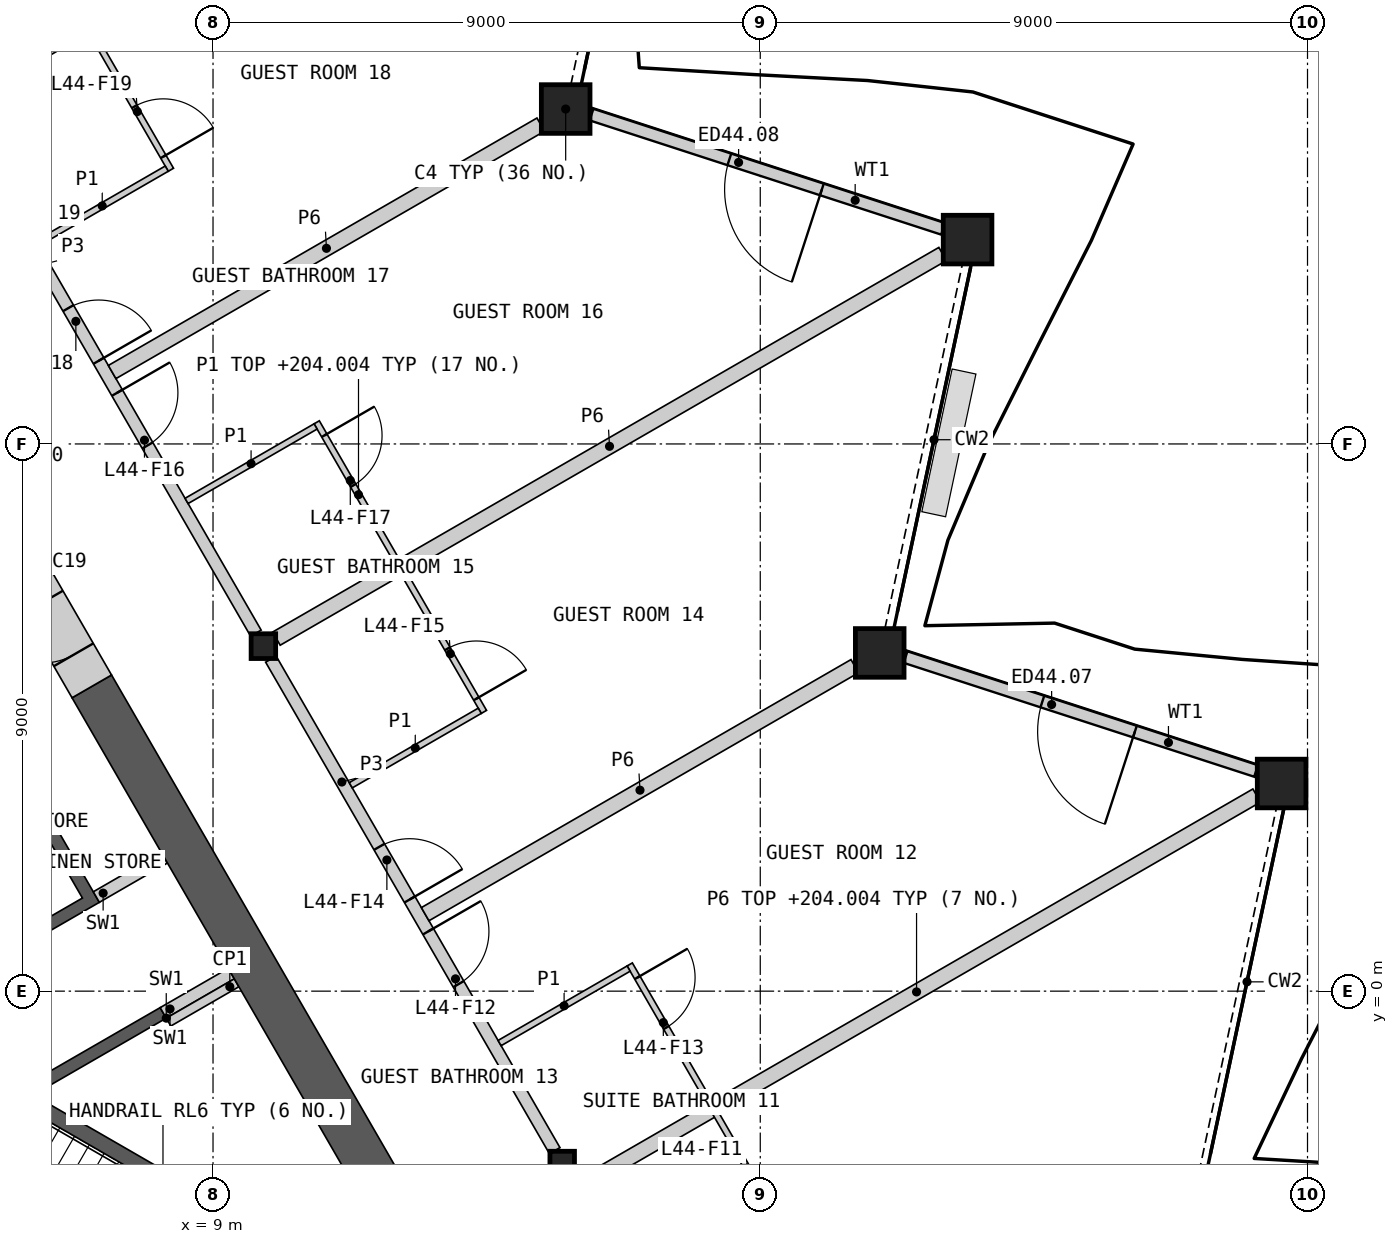
"""IFC4 building model, lengths in metres.
Left out: names, types, materials, properties, quantities, classifications, styles, units other than length and angle.
Written with IfcOpenShell. Run it as: python <this file> out.ifc"""

import sys

from ifc_helpers import new_model, si_unit, direction, frame, frame_2d, origin, origin_2d, place, context, subcontext, project, spatial, polyline, rectangle, hollow_rectangle, i_section, outline, extrude, element, fill, save


model = new_model("IFC4")
c1 = context("Model", 3, precision=1e-05, world=origin(), true_north=direction((0.0, 1.0)))
c2 = subcontext(c1, "Body", "Model", "MODEL_VIEW")
j1 = project(units=[si_unit("LENGTHUNIT", "METRE"), si_unit("PLANEANGLEUNIT", "RADIAN")], contexts=[c1])
p1 = place(None, origin())
s1 = spatial("IfcSite", under=j1, at=p1, CompositionType="ELEMENT")
p2 = place(p1, origin())
s2 = spatial("IfcBuilding", under=s1, at=p2, CompositionType="ELEMENT")
p3 = place(p2, frame((0.0, 0.0, 201.6)))
s3 = spatial("IfcBuildingStorey", under=s2, at=p3, CompositionType="ELEMENT", Elevation=201.6)
for number, where, z_axis, x_axis in (
    (1, (26.574, 3.415, 0.0), (0.0, 0.0, 1.0), (1.0, 0.0, 0.0)),
    (2, (19.965, 5.563, 0.0), (0.0, 0.0, 1.0), (1.0, 0.0, 0.0)),
    (3, (21.409, 12.361, 0.0), (0.0, 0.0, 1.0), (1.0, 0.0, 0.0)),
    (4, (14.8, 14.508, 0.0), (0.0, 0.0, 1.0), (1.0, 0.0, 0.0)),
):
    element("IfcColumn", number, at=place(p3, frame(where, z_axis=z_axis, x_axis=x_axis)), inside=s3, PredefinedType="COLUMN", context=c2, shape_type="SweptSolid", body=[
        extrude(hollow_rectangle(XDim=0.8, YDim=0.8, WallThickness=0.05, at=origin_2d()), origin(), (0.0, 0.0, 1.0), 3.6),
    ])
for number, where, z_axis, x_axis in (
    (5, (14.743, -2.837, 0.0), (0.0, 0.0, 1.0), (1.0, 0.0, 0.0)),
    (6, (9.828, 5.675, 0.0), (0.0, 0.0, 1.0), (1.0, 0.0, 0.0)),
):
    element("IfcColumn", number, at=place(p3, frame(where, z_axis=z_axis, x_axis=x_axis)), inside=s3, PredefinedType="COLUMN", context=c2, shape_type="SweptSolid", body=[
        extrude(i_section(OverallWidth=0.404, OverallDepth=0.407, WebThickness=0.027, FlangeThickness=0.044, at=origin_2d()), origin(), (0.0, 0.0, 1.0), 3.6),
    ])
p4 = place(p3, frame((26.154, 3.621, 0.0), z_axis=(0.0, 0.0, 1.0), x_axis=(-0.95104857086, 0.309041446839, 0.0)))
e7 = element("IfcWall", 7, at=p4, inside=s3, PredefinedType="SOLIDWALL", context=c2, shape_type="SweptSolid", body=[
    extrude(rectangle(XDim=6.062, YDim=0.2, at=frame_2d((3.031, 0.0))), origin(), (0.0, 0.0, 1.0), 2.701),
])
p5 = place(p4, frame((2.096, 0.0, 0.0)))
e8 = element("IfcOpeningElement", 8, at=p5, cuts=e7, PredefinedType="OPENING", context=c2, shape_type="SweptSolid", body=[
    extrude(rectangle(XDim=1.6, YDim=2.4, at=frame_2d((0.8, 1.2))), frame((0.0, 0.11, 0.0), z_axis=(0.0, -1.0, 0.0), x_axis=(1.0, 0.0, 0.0)), (0.0, 0.0, 1.0), 0.22),
])
p6 = place(p3, frame((21.006, 12.538, 0.0), z_axis=(0.0, 0.0, 1.0), x_axis=(-0.951049709595, 0.309037942458, 0.0)))
e9 = element("IfcWall", 9, at=p6, inside=s3, PredefinedType="SOLIDWALL", context=c2, shape_type="SweptSolid", body=[
    extrude(rectangle(XDim=6.079, YDim=0.2, at=frame_2d((3.04, 0.0))), origin(), (0.0, 0.0, 1.0), 2.701),
])
p7 = place(p6, frame((2.096, 0.0, 0.0)))
e10 = element("IfcOpeningElement", 10, at=p7, cuts=e9, PredefinedType="OPENING", context=c2, shape_type="SweptSolid", body=[
    extrude(rectangle(XDim=1.6, YDim=2.4, at=frame_2d((0.8, 1.2))), frame((0.0, 0.11, 0.0), z_axis=(0.0, -1.0, 0.0), x_axis=(1.0, 0.0, 0.0)), (0.0, 0.0, 1.0), 0.22),
])
p8 = place(p3, origin())
e11 = element("IfcWall", 11, at=p8, inside=s3, PredefinedType="SHEAR", context=c2, shape_type="SweptSolid", body=[
    extrude(outline(polyline([(1.561, 6.097), (3.731, 7.35), (7.131, 1.461), (4.96, 0.208), (4.861, 0.381), (6.852, 1.531), (4.752, 5.169), (2.76, 4.019), (2.66, 4.192), (4.652, 5.342), (3.652, 7.074), (1.66, 5.924), (1.561, 6.097)])), origin(), (0.0, 0.0, 1.0), 3.25),
])
p9 = place(p3, origin())
e12 = element("IfcWall", 12, at=p9, inside=s3, PredefinedType="SHEAR", context=c2, shape_type="SweptSolid", body=[
    extrude(outline(polyline([(8.231, -0.444), (6.061, -1.697), (5.96, -1.524), (8.131, -0.271), (8.231, -0.444)])), origin(), (0.0, 0.0, 1.0), 3.25),
])
for number, where, z_axis, x_axis in (
    (13, (8.181, -0.357, 0.0), (0.0, 0.0, 1.0), (0.866, 0.5, 0.0)),
    (14, (7.081, 1.548, 0.0), (0.0, 0.0, 1.0), (0.866, 0.5, 0.0)),
):
    element("IfcWall", number, at=place(p3, frame(where, z_axis=z_axis, x_axis=x_axis)), inside=s3, PredefinedType="SHEAR", context=c2, shape_type="SweptSolid", body=[
        extrude(rectangle(XDim=1.293, YDim=0.2, at=frame_2d((0.646, 0.0))), origin(), (0.0, 0.0, 1.0), 3.25),
    ])
p10 = place(p3, origin())
e15 = element("IfcWall", 15, at=p10, inside=s3, PredefinedType="SHEAR", context=c2, shape_type="SweptSolid", body=[
    extrude(outline(polyline([(10.032, -4.298), (10.374, -4.206), (5.307, -1.281), (5.182, -1.498), (10.032, -4.298)])), origin(), (0.0, 0.0, 1.0), 3.25),
])
p11 = place(p3, frame((8.268, -0.509, 0.0), z_axis=(0.0, 0.0, 1.0), x_axis=(0.866003189247, 0.500038474733, 0.0)))
e16 = element("IfcWall", 16, at=p11, inside=s3, PredefinedType="PARTITIONING", context=c2, shape_type="SweptSolid", body=[
    extrude(rectangle(XDim=1.293, YDim=0.15, at=frame_2d((0.646, 0.0))), origin(), (0.0, 0.0, 1.0), 3.25),
])
p12 = place(p3, frame((14.526, -8.011, 0.0), z_axis=(0.0, 0.0, 1.0), x_axis=(-0.499996012963, 0.866027705689, 0.0)))
e17 = element("IfcWall", 17, at=p12, inside=s3, PredefinedType="SHEAR", context=c2, shape_type="SweptSolid", body=[
    extrude(rectangle(XDim=15.039, YDim=0.75, at=frame_2d((7.519, 0.0))), origin(), (0.0, 0.0, 1.0), 3.25),
])
p13 = place(p3, frame((7.006, 5.012, 0.0), z_axis=(0.0, 0.0, 1.0), x_axis=(-0.499946605688, 0.86605622881, 0.0)))
e18 = element("IfcWall", 18, at=p13, inside=s3, PredefinedType="SHEAR", context=c2, shape_type="SweptSolid", body=[
    extrude(rectangle(XDim=2.2, YDim=0.75, at=frame_2d((1.1, 0.0))), origin(), (0.0, 0.0, 1.0), 3.25),
])
p14 = place(p13, frame((0.6, 0.0, 0.0)))
e19 = element("IfcOpeningElement", 19, at=p14, cuts=e18, PredefinedType="OPENING", context=c2, shape_type="SweptSolid", body=[
    extrude(rectangle(XDim=1.0, YDim=2.1, at=frame_2d((0.5, 1.05))), frame((0.0, 0.385, 0.0), z_axis=(0.0, -1.0, 0.0), x_axis=(1.0, 0.0, 0.0)), (0.0, 0.0, 1.0), 0.77),
])
p15 = place(p3, frame((14.977, -3.242, 0.0), z_axis=(0.0, 0.0, 1.0), x_axis=(0.866026026416, 0.499998921569, 0.0)))
e20 = element("IfcWall", 20, at=p15, inside=s3, PredefinedType="PARTITIONING", context=c2, shape_type="SweptSolid", body=[
    extrude(rectangle(XDim=12.918, YDim=0.25, at=frame_2d((6.459, 0.0))), origin(), (0.0, 0.0, 1.0), 2.404),
])
p16 = place(p3, frame((4.572, 14.529, 0.0), z_axis=(0.0, 0.0, 1.0), x_axis=(0.866023333059, 0.500003586584, 0.0)))
e21 = element("IfcWall", 21, at=p16, inside=s3, PredefinedType="PARTITIONING", context=c2, shape_type="SweptSolid", body=[
    extrude(rectangle(XDim=13.005, YDim=0.25, at=frame_2d((6.502, 0.0))), origin(), (0.0, 0.0, 1.0), 2.404),
])
p17 = place(p3, frame((10.042, 5.798, 0.0), z_axis=(0.0, 0.0, 1.0), x_axis=(0.866025883649, 0.499999168849, 0.0)))
e22 = element("IfcWall", 22, at=p17, inside=s3, PredefinedType="PARTITIONING", context=c2, shape_type="SweptSolid", body=[
    extrude(rectangle(XDim=12.652, YDim=0.25, at=frame_2d((6.326, 0.0))), origin(), (0.0, 0.0, 1.0), 2.404),
])
p18 = place(p3, frame((5.038, 13.972, 0.0), z_axis=(0.0, 0.0, 1.0), x_axis=(0.50000393355, -0.866023132736, 0.0)))
e23 = element("IfcWall", 23, at=p18, inside=s3, PredefinedType="PARTITIONING", context=c2, shape_type="SweptSolid", body=[
    extrude(rectangle(XDim=9.335, YDim=0.2, at=frame_2d((4.667, 0.0))), origin(), (0.0, 0.0, 1.0), 3.25),
])
p19 = place(p18, frame((4.77, 0.0, 0.0)))
e24 = element("IfcOpeningElement", 24, at=p19, cuts=e23, PredefinedType="OPENING", context=c2, shape_type="SweptSolid", body=[
    extrude(rectangle(XDim=1.0, YDim=2.1, at=frame_2d((0.5, 1.05))), frame((0.0, 0.11, 0.0), z_axis=(0.0, -1.0, 0.0), x_axis=(1.0, 0.0, 0.0)), (0.0, 0.0, 1.0), 0.22),
])
p20 = place(p18, frame((3.163, 0.0, 0.0)))
e25 = element("IfcOpeningElement", 25, at=p20, cuts=e23, PredefinedType="OPENING", context=c2, shape_type="SweptSolid", body=[
    extrude(rectangle(XDim=1.0, YDim=2.1, at=frame_2d((0.5, 1.05))), frame((0.0, 0.11, 0.0), z_axis=(0.0, -1.0, 0.0), x_axis=(1.0, 0.0, 0.0)), (0.0, 0.0, 1.0), 0.22),
])
p21 = place(p3, frame((9.952, 5.461, 0.0), z_axis=(0.0, 0.0, 1.0), x_axis=(0.50000393355, -0.866023132736, 0.0)))
e26 = element("IfcWall", 26, at=p21, inside=s3, PredefinedType="PARTITIONING", context=c2, shape_type="SweptSolid", body=[
    extrude(rectangle(XDim=9.335, YDim=0.2, at=frame_2d((4.667, 0.0))), origin(), (0.0, 0.0, 1.0), 3.25),
])
p22 = place(p21, frame((5.172, 0.0, 0.0)))
e27 = element("IfcOpeningElement", 27, at=p22, cuts=e26, PredefinedType="OPENING", context=c2, shape_type="SweptSolid", body=[
    extrude(rectangle(XDim=1.0, YDim=2.1, at=frame_2d((0.5, 1.05))), frame((0.0, 0.11, 0.0), z_axis=(0.0, -1.0, 0.0), x_axis=(1.0, 0.0, 0.0)), (0.0, 0.0, 1.0), 0.22),
])
p23 = place(p21, frame((3.565, 0.0, 0.0)))
e28 = element("IfcOpeningElement", 28, at=p23, cuts=e26, PredefinedType="OPENING", context=c2, shape_type="SweptSolid", body=[
    extrude(rectangle(XDim=1.0, YDim=2.1, at=frame_2d((0.5, 1.05))), frame((0.0, 0.11, 0.0), z_axis=(0.0, -1.0, 0.0), x_axis=(1.0, 0.0, 0.0)), (0.0, 0.0, 1.0), 0.22),
])
p24 = place(p3, frame((12.489, 1.266, 0.0), z_axis=(0.0, 0.0, 1.0), x_axis=(0.866026623601, 0.49999788721, 0.0)))
e29 = element("IfcWall", 29, at=p24, inside=s3, PredefinedType="PARTITIONING", context=c2, shape_type="SweptSolid", body=[
    extrude(rectangle(XDim=8.159, YDim=0.25, at=frame_2d((4.079, 0.0))), origin(), (0.0, 0.0, 1.0), 2.404),
])
p25 = place(p3, frame((7.341, 10.183, 0.0), z_axis=(0.0, 0.0, 1.0), x_axis=(0.866028741424, 0.499994218994, 0.0)))
e30 = element("IfcWall", 30, at=p25, inside=s3, PredefinedType="PARTITIONING", context=c2, shape_type="SweptSolid", body=[
    extrude(rectangle(XDim=8.139, YDim=0.25, at=frame_2d((4.07, 0.0))), origin(), (0.0, 0.0, 1.0), 2.404),
])
p26 = place(p3, frame((10.705, 9.356, 0.0), z_axis=(0.0, 0.0, 1.0), x_axis=(0.500015767406, -0.866016300277, 0.0)))
e31 = element("IfcWall", 31, at=p26, inside=s3, PredefinedType="PARTITIONING", context=c2, shape_type="SweptSolid", body=[
    extrude(rectangle(XDim=5.5, YDim=0.1, at=frame_2d((2.75, 0.0))), origin(), (0.0, 0.0, 1.0), 2.404),
])
p27 = place(p26, frame((4.3, 0.0, 0.0)))
e32 = element("IfcOpeningElement", 32, at=p27, cuts=e31, PredefinedType="OPENING", context=c2, shape_type="SweptSolid", body=[
    extrude(rectangle(XDim=0.95, YDim=2.1, at=frame_2d((0.475, 1.05))), frame((0.0, 0.06, 0.0), z_axis=(0.0, -1.0, 0.0), x_axis=(1.0, 0.0, 0.0)), (0.0, 0.0, 1.0), 0.12),
])
p28 = place(p26, frame((0.25, 0.0, 0.0)))
e33 = element("IfcOpeningElement", 33, at=p28, cuts=e31, PredefinedType="OPENING", context=c2, shape_type="SweptSolid", body=[
    extrude(rectangle(XDim=0.95, YDim=2.1, at=frame_2d((0.475, 1.05))), frame((0.0, 0.06, 0.0), z_axis=(0.0, -1.0, 0.0), x_axis=(1.0, 0.0, 0.0)), (0.0, 0.0, 1.0), 0.12),
])
p29 = place(p3, frame((5.707, 18.013, 0.0), z_axis=(0.0, 0.0, 1.0), x_axis=(0.500006934395, -0.866021400173, 0.0)))
e34 = element("IfcWall", 34, at=p29, inside=s3, PredefinedType="PARTITIONING", context=c2, shape_type="SweptSolid", body=[
    extrude(rectangle(XDim=5.2, YDim=0.1, at=frame_2d((2.6, 0.0))), origin(), (0.0, 0.0, 1.0), 2.404),
])
p30 = place(p29, frame((4.0, 0.0, 0.0)))
e35 = element("IfcOpeningElement", 35, at=p30, cuts=e34, PredefinedType="OPENING", context=c2, shape_type="SweptSolid", body=[
    extrude(rectangle(XDim=0.95, YDim=2.1, at=frame_2d((0.475, 1.05))), frame((0.0, 0.06, 0.0), z_axis=(0.0, -1.0, 0.0), x_axis=(1.0, 0.0, 0.0)), (0.0, 0.0, 1.0), 0.12),
])
p31 = place(p29, frame((0.25, 0.0, 0.0)))
e36 = element("IfcOpeningElement", 36, at=p31, cuts=e34, PredefinedType="OPENING", context=c2, shape_type="SweptSolid", body=[
    extrude(rectangle(XDim=0.95, YDim=2.1, at=frame_2d((0.475, 1.05))), frame((0.0, 0.06, 0.0), z_axis=(0.0, -1.0, 0.0), x_axis=(1.0, 0.0, 0.0)), (0.0, 0.0, 1.0), 0.12),
])
p32 = place(p3, frame((15.853, 0.439, 0.0), z_axis=(0.0, 0.0, 1.0), x_axis=(0.499971721724, -0.866041729639, 0.0)))
e37 = element("IfcWall", 37, at=p32, inside=s3, PredefinedType="PARTITIONING", context=c2, shape_type="SweptSolid", body=[
    extrude(rectangle(XDim=5.2, YDim=0.1, at=frame_2d((2.6, 0.0))), origin(), (0.0, 0.0, 1.0), 2.404),
])
p33 = place(p32, frame((4.0, 0.0, 0.0)))
e38 = element("IfcOpeningElement", 38, at=p33, cuts=e37, PredefinedType="OPENING", context=c2, shape_type="SweptSolid", body=[
    extrude(rectangle(XDim=0.95, YDim=2.1, at=frame_2d((0.475, 1.05))), frame((0.0, 0.06, 0.0), z_axis=(0.0, -1.0, 0.0), x_axis=(1.0, 0.0, 0.0)), (0.0, 0.0, 1.0), 0.12),
])
p34 = place(p32, frame((0.25, 0.0, 0.0)))
e39 = element("IfcOpeningElement", 39, at=p34, cuts=e37, PredefinedType="OPENING", context=c2, shape_type="SweptSolid", body=[
    extrude(rectangle(XDim=0.95, YDim=2.1, at=frame_2d((0.475, 1.05))), frame((0.0, 0.06, 0.0), z_axis=(0.0, -1.0, 0.0), x_axis=(1.0, 0.0, 0.0)), (0.0, 0.0, 1.0), 0.12),
])
for number, where, z_axis, x_axis in (
    (40, (6.117, 12.303, 0.0), (0.0, 0.0, 1.0), (0.866, 0.5, 0.0)),
    (41, (13.713, -0.854, 0.0), (0.0, 0.0, 1.0), (0.866, 0.5, 0.0)),
):
    element("IfcWall", number, at=place(p3, frame(where, z_axis=z_axis, x_axis=x_axis)), inside=s3, PredefinedType="PARTITIONING", context=c2, shape_type="SweptSolid", body=[
        extrude(rectangle(XDim=2.45, YDim=0.1, at=frame_2d((1.225, 0.0))), origin(), (0.0, 0.0, 1.0), 2.404),
    ])
for number, where, z_axis, x_axis in (
    (42, (8.565, 8.063, 0.0), (0.0, 0.0, 1.0), (0.866, 0.5, 0.0)),
    (43, (11.265, 3.386, 0.0), (0.0, 0.0, 1.0), (0.866, 0.5, 0.0)),
):
    element("IfcWall", number, at=place(p3, frame(where, z_axis=z_axis, x_axis=x_axis)), inside=s3, PredefinedType="PARTITIONING", context=c2, shape_type="SweptSolid", body=[
        extrude(rectangle(XDim=2.45, YDim=0.1, at=frame_2d((1.225, 0.0))), origin(), (0.0, 0.0, 1.0), 2.404),
    ])
p35 = place(p5, origin())
e44 = element("IfcDoor", 44, at=p35, inside=s3, OperationType="DOUBLE_DOOR_SINGLE_SWING", PredefinedType="DOOR", context=c2, shape_type="SweptSolid", body=[
    extrude(rectangle(XDim=1.6, YDim=2.4, at=frame_2d((0.8, 1.2))), frame((0.0, 0.025, 0.0), z_axis=(0.0, -1.0, 0.0), x_axis=(1.0, 0.0, 0.0)), (0.0, 0.0, 1.0), 0.05),
])
fill(e8, e44)
p36 = place(p7, origin())
e45 = element("IfcDoor", 45, at=p36, inside=s3, OperationType="DOUBLE_DOOR_SINGLE_SWING", PredefinedType="DOOR", context=c2, shape_type="SweptSolid", body=[
    extrude(rectangle(XDim=1.6, YDim=2.4, at=frame_2d((0.8, 1.2))), frame((0.0, 0.025, 0.0), z_axis=(0.0, -1.0, 0.0), x_axis=(1.0, 0.0, 0.0)), (0.0, 0.0, 1.0), 0.05),
])
fill(e10, e45)
p37 = place(p14, origin())
e46 = element("IfcDoor", 46, at=p37, inside=s3, OperationType="SINGLE_SWING_RIGHT", PredefinedType="DOOR", context=c2, shape_type="SweptSolid", body=[
    extrude(rectangle(XDim=1.0, YDim=2.1, at=frame_2d((0.5, 1.05))), frame((0.0, 0.13, 0.0), z_axis=(0.0, -1.0, 0.0), x_axis=(1.0, 0.0, 0.0)), (0.0, 0.0, 1.0), 0.05),
])
fill(e19, e46)
p38 = place(p22, origin())
e47 = element("IfcDoor", 47, at=p38, inside=s3, OperationType="SINGLE_SWING_LEFT", PredefinedType="DOOR", context=c2, shape_type="SweptSolid", body=[
    extrude(rectangle(XDim=1.0, YDim=2.1, at=frame_2d((0.5, 1.05))), frame((0.0, 0.025, 0.0), z_axis=(0.0, -1.0, 0.0), x_axis=(1.0, 0.0, 0.0)), (0.0, 0.0, 1.0), 0.05),
])
fill(e27, e47)
p39 = place(p34, origin())
e48 = element("IfcDoor", 48, at=p39, inside=s3, OperationType="SINGLE_SWING_LEFT", PredefinedType="DOOR", context=c2, shape_type="SweptSolid", body=[
    extrude(rectangle(XDim=0.95, YDim=2.1, at=frame_2d((0.475, 1.05))), frame((0.0, 0.025, 0.0), z_axis=(0.0, -1.0, 0.0), x_axis=(1.0, 0.0, 0.0)), (0.0, 0.0, 1.0), 0.05),
])
fill(e39, e48)
p40 = place(p23, origin())
e49 = element("IfcDoor", 49, at=p40, inside=s3, OperationType="SINGLE_SWING_RIGHT", PredefinedType="DOOR", context=c2, shape_type="SweptSolid", body=[
    extrude(rectangle(XDim=1.0, YDim=2.1, at=frame_2d((0.5, 1.05))), frame((0.0, 0.025, 0.0), z_axis=(0.0, -1.0, 0.0), x_axis=(1.0, 0.0, 0.0)), (0.0, 0.0, 1.0), 0.05),
])
fill(e28, e49)
p41 = place(p27, origin())
e50 = element("IfcDoor", 50, at=p41, inside=s3, OperationType="SINGLE_SWING_RIGHT", PredefinedType="DOOR", context=c2, shape_type="SweptSolid", body=[
    extrude(rectangle(XDim=0.95, YDim=2.1, at=frame_2d((0.475, 1.05))), frame((0.0, 0.025, 0.0), z_axis=(0.0, -1.0, 0.0), x_axis=(1.0, 0.0, 0.0)), (0.0, 0.0, 1.0), 0.05),
])
fill(e32, e50)
p42 = place(p19, origin())
e51 = element("IfcDoor", 51, at=p42, inside=s3, OperationType="SINGLE_SWING_LEFT", PredefinedType="DOOR", context=c2, shape_type="SweptSolid", body=[
    extrude(rectangle(XDim=1.0, YDim=2.1, at=frame_2d((0.5, 1.05))), frame((0.0, 0.025, 0.0), z_axis=(0.0, -1.0, 0.0), x_axis=(1.0, 0.0, 0.0)), (0.0, 0.0, 1.0), 0.05),
])
fill(e24, e51)
p43 = place(p28, origin())
e52 = element("IfcDoor", 52, at=p43, inside=s3, OperationType="SINGLE_SWING_LEFT", PredefinedType="DOOR", context=c2, shape_type="SweptSolid", body=[
    extrude(rectangle(XDim=0.95, YDim=2.1, at=frame_2d((0.475, 1.05))), frame((0.0, 0.025, 0.0), z_axis=(0.0, -1.0, 0.0), x_axis=(1.0, 0.0, 0.0)), (0.0, 0.0, 1.0), 0.05),
])
fill(e33, e52)
p44 = place(p20, origin())
e53 = element("IfcDoor", 53, at=p44, inside=s3, OperationType="SINGLE_SWING_RIGHT", PredefinedType="DOOR", context=c2, shape_type="SweptSolid", body=[
    extrude(rectangle(XDim=1.0, YDim=2.1, at=frame_2d((0.5, 1.05))), frame((0.0, 0.025, 0.0), z_axis=(0.0, -1.0, 0.0), x_axis=(1.0, 0.0, 0.0)), (0.0, 0.0, 1.0), 0.05),
])
fill(e25, e53)
p45 = place(p30, origin())
e54 = element("IfcDoor", 54, at=p45, inside=s3, OperationType="SINGLE_SWING_RIGHT", PredefinedType="DOOR", context=c2, shape_type="SweptSolid", body=[
    extrude(rectangle(XDim=0.95, YDim=2.1, at=frame_2d((0.475, 1.05))), frame((0.0, 0.025, 0.0), z_axis=(0.0, -1.0, 0.0), x_axis=(1.0, 0.0, 0.0)), (0.0, 0.0, 1.0), 0.05),
])
fill(e35, e54)
save(model, sys.argv[1])
